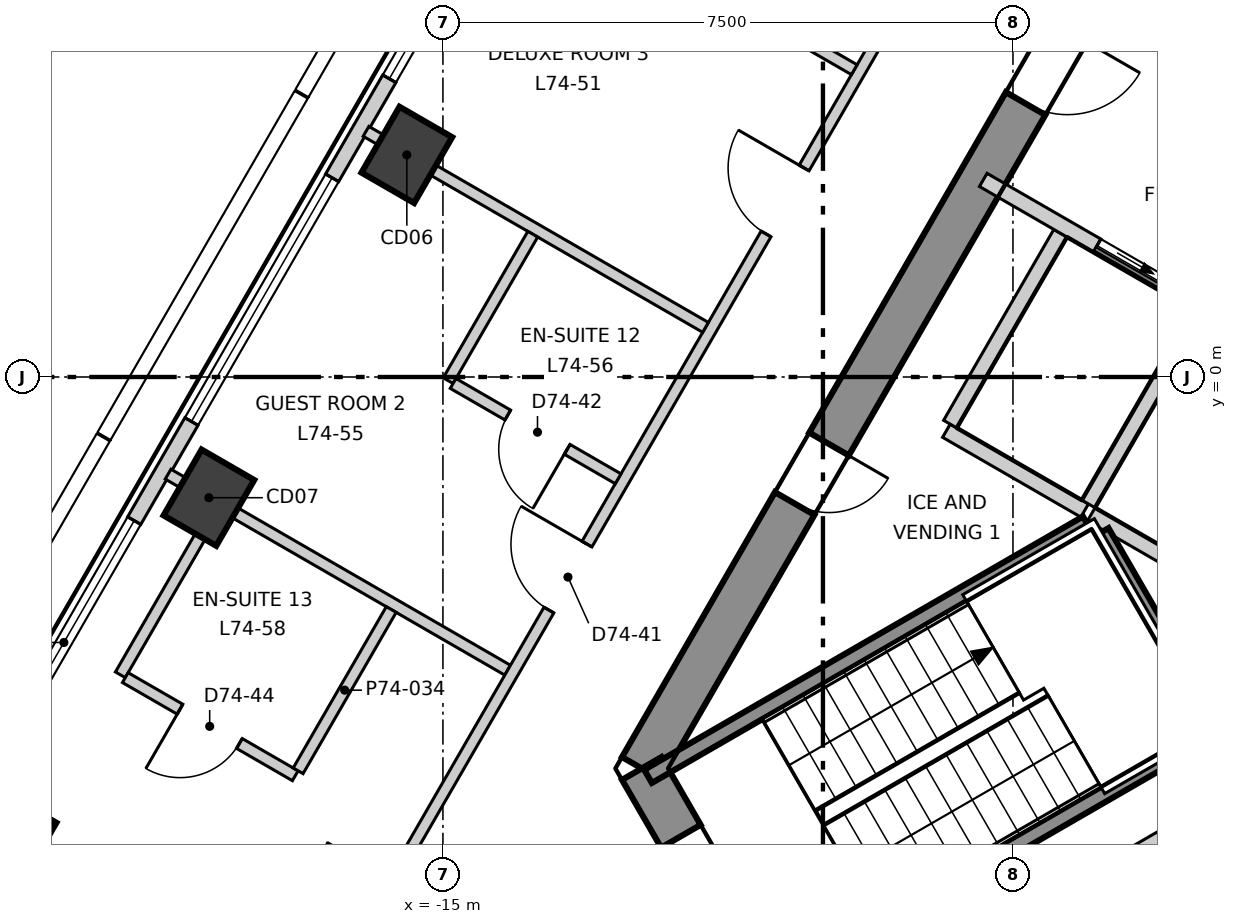
"""IFC4 building model, lengths in metres.
Left out: names, types, materials, properties, quantities, classifications, styles, units other than length and angle.
Written with IfcOpenShell. Run it as: python <this file> out.ifc"""

import sys

from ifc_helpers import new_model, si_unit, direction, frame, frame_2d, origin, origin_2d, place, context, subcontext, project, spatial, polyline, rectangle, outline, extrude, element, fill, save


model = new_model("IFC4")
c1 = context("Model", 3, precision=1e-05, world=origin(), true_north=direction((0.0, 1.0)))
c2 = subcontext(c1, "Body", "Model", "MODEL_VIEW")
j1 = project(units=[si_unit("LENGTHUNIT", "METRE"), si_unit("PLANEANGLEUNIT", "RADIAN")], contexts=[c1])
p1 = place(None, origin())
s1 = spatial("IfcSite", under=j1, at=p1, CompositionType="ELEMENT")
p2 = place(p1, origin())
s2 = spatial("IfcBuilding", under=s1, at=p2, CompositionType="ELEMENT")
p3 = place(p2, frame((0.0, 0.0, 311.5)))
s3 = spatial("IfcBuildingStorey", under=s2, at=p3, CompositionType="ELEMENT", Elevation=311.5)
p4 = place(p3, frame((-1.732, 13.3, -0.3), z_axis=(0.0, 0.0, 1.0), x_axis=(-0.500000539815, -0.866025092122, 0.0)))
e1 = element("IfcWall", 1, at=p4, inside=s3, PredefinedType="SHEAR", context=c2, shape_type="SweptSolid", body=[
    extrude(outline(polyline([(-0.173, -0.3), (1.795, -0.3), (3.763, -0.3), (5.732, -0.3), (7.7, -0.3), (9.668, -0.301), (11.637, -0.301), (13.605, -0.301), (15.573, -0.301), (17.542, -0.301), (19.51, -0.301), (21.478, -0.301), (21.131, 0.3), (19.226, 0.3), (17.321, 0.3), (15.415, 0.3), (13.51, 0.3), (11.605, 0.3), (9.699, 0.3), (7.794, 0.3), (5.889, 0.3), (3.984, 0.3), (2.078, 0.3), (0.173, 0.3), (-0.173, -0.3)])), origin(), (0.0, 0.0, 1.0), 3.6),
])
p5 = place(p4, frame((10.102, 0.0, 0.3)))
e2 = element("IfcOpeningElement", 2, at=p5, cuts=e1, PredefinedType="OPENING", context=c2, shape_type="SweptSolid", body=[
    extrude(rectangle(XDim=1.1, YDim=2.1, at=frame_2d((0.55, 1.05))), frame((0.0, 0.31, 0.0), z_axis=(0.0, -1.0, 0.0), x_axis=(1.0, 0.0, 0.0)), (0.0, 0.0, 1.0), 0.621),
])
p6 = place(p4, frame((16.378, 0.0, 0.3)))
e3 = element("IfcOpeningElement", 3, at=p6, cuts=e1, PredefinedType="OPENING", context=c2, shape_type="SweptSolid", body=[
    extrude(rectangle(XDim=0.9, YDim=2.1, at=frame_2d((0.45, 1.05))), frame((0.0, 0.31, 0.0), z_axis=(0.0, -1.0, 0.0), x_axis=(1.0, 0.0, 0.0)), (0.0, 0.0, 1.0), 0.621),
])
p7 = place(p4, frame((4.106, 0.0, 0.3)))
e4 = element("IfcOpeningElement", 4, at=p7, cuts=e1, PredefinedType="OPENING", context=c2, shape_type="SweptSolid", body=[
    extrude(rectangle(XDim=1.0, YDim=2.1, at=frame_2d((0.5, 1.05))), frame((0.0, 0.31, 0.0), z_axis=(0.0, -1.0, 0.0), x_axis=(1.0, 0.0, 0.0)), (0.0, 0.0, 1.0), 0.621),
])
p8 = place(p3, frame((-12.384, -5.15, -0.3), z_axis=(0.0, 0.0, 1.0), x_axis=(0.49997462182, -0.866040055388, 0.0)))
e5 = element("IfcWall", 5, at=p8, inside=s3, PredefinedType="SHEAR", context=c2, shape_type="SweptSolid", body=[
    extrude(outline(polyline([(-0.173, -0.301), (1.732, -0.301), (3.637, -0.3), (3.291, 0.3), (1.732, 0.3), (0.173, 0.3), (-0.173, -0.301)])), origin(), (0.0, 0.0, 1.0), 3.6),
])
p9 = place(p8, frame((1.032, 0.0, 0.3)))
e6 = element("IfcOpeningElement", 6, at=p9, cuts=e5, PredefinedType="OPENING", context=c2, shape_type="SweptSolid", body=[
    extrude(rectangle(XDim=1.4, YDim=2.1, at=frame_2d((0.7, 1.05))), frame((0.0, 0.31, 0.0), z_axis=(0.0, -1.0, 0.0), x_axis=(1.0, 0.0, 0.0)), (0.0, 0.0, 1.0), 0.621),
])
for number, where, z_axis, x_axis in (
    (7, (-15.475, 2.922, -0.3), (0.0, 0.0, 1.0), (0.5, 0.866, 0.0)),
    (8, (-18.079, -1.588, -0.3), (0.0, 0.0, 1.0), (0.5, 0.866, 0.0)),
    (9, (-20.682, -6.097, -0.3), (0.0, 0.0, 1.0), (0.5, 0.866, 0.0)),
):
    element("IfcColumn", number, at=place(p3, frame(where, z_axis=z_axis, x_axis=x_axis)), inside=s3, PredefinedType="COLUMN", context=c2, shape_type="SweptSolid", body=[
        extrude(rectangle(XDim=1.0, YDim=0.8, at=origin_2d()), origin(), (0.0, 0.0, 1.0), 3.6),
    ])
p10 = place(p3, frame((-2.412, 26.948, 0.0), z_axis=(0.0, 0.0, 1.0), x_axis=(-0.500002044679, -0.866024223285, 0.0)))
e10 = element("IfcWall", 10, at=p10, inside=s3, PredefinedType="ELEMENTEDWALL", context=c2, shape_type="SweptSolid", body=[
    extrude(rectangle(XDim=44.243, YDim=0.2, at=frame_2d((22.122, 0.0))), origin(), (0.0, 0.0, 1.0), 3.3),
])
p11 = place(p10, frame((2.056, 0.0, 0.9)))
e11 = element("IfcOpeningElement", 11, at=p11, cuts=e10, PredefinedType="OPENING", context=c2, shape_type="SweptSolid", body=[
    extrude(rectangle(XDim=3.7, YDim=2.2, at=frame_2d((1.85, 1.1))), frame((0.0, 0.11, 0.0), z_axis=(0.0, -1.0, 0.0), x_axis=(1.0, 0.0, 0.0)), (0.0, 0.0, 1.0), 0.22),
])
p12 = place(p10, frame((7.263, 0.0, 0.9)))
e12 = element("IfcOpeningElement", 12, at=p12, cuts=e10, PredefinedType="OPENING", context=c2, shape_type="SweptSolid", body=[
    extrude(rectangle(XDim=3.7, YDim=2.2, at=frame_2d((1.85, 1.1))), frame((0.0, 0.11, 0.0), z_axis=(0.0, -1.0, 0.0), x_axis=(1.0, 0.0, 0.0)), (0.0, 0.0, 1.0), 0.22),
])
p13 = place(p10, frame((12.471, 0.0, 0.9)))
e13 = element("IfcOpeningElement", 13, at=p13, cuts=e10, PredefinedType="OPENING", context=c2, shape_type="SweptSolid", body=[
    extrude(rectangle(XDim=3.7, YDim=2.2, at=frame_2d((1.85, 1.1))), frame((0.0, 0.11, 0.0), z_axis=(0.0, -1.0, 0.0), x_axis=(1.0, 0.0, 0.0)), (0.0, 0.0, 1.0), 0.22),
])
p14 = place(p10, frame((17.678, 0.0, 0.9)))
e14 = element("IfcOpeningElement", 14, at=p14, cuts=e10, PredefinedType="OPENING", context=c2, shape_type="SweptSolid", body=[
    extrude(rectangle(XDim=3.7, YDim=2.2, at=frame_2d((1.85, 1.1))), frame((0.0, 0.11, 0.0), z_axis=(0.0, -1.0, 0.0), x_axis=(1.0, 0.0, 0.0)), (0.0, 0.0, 1.0), 0.22),
])
p15 = place(p10, frame((22.885, 0.0, 0.9)))
e15 = element("IfcOpeningElement", 15, at=p15, cuts=e10, PredefinedType="OPENING", context=c2, shape_type="SweptSolid", body=[
    extrude(rectangle(XDim=3.7, YDim=2.2, at=frame_2d((1.85, 1.1))), frame((0.0, 0.11, 0.0), z_axis=(0.0, -1.0, 0.0), x_axis=(1.0, 0.0, 0.0)), (0.0, 0.0, 1.0), 0.22),
])
p16 = place(p10, frame((28.092, 0.0, 0.9)))
e16 = element("IfcOpeningElement", 16, at=p16, cuts=e10, PredefinedType="OPENING", context=c2, shape_type="SweptSolid", body=[
    extrude(rectangle(XDim=3.7, YDim=2.2, at=frame_2d((1.85, 1.1))), frame((0.0, 0.11, 0.0), z_axis=(0.0, -1.0, 0.0), x_axis=(1.0, 0.0, 0.0)), (0.0, 0.0, 1.0), 0.22),
])
p17 = place(p10, frame((33.3, 0.0, 0.9)))
e17 = element("IfcOpeningElement", 17, at=p17, cuts=e10, PredefinedType="OPENING", context=c2, shape_type="SweptSolid", body=[
    extrude(rectangle(XDim=3.7, YDim=2.2, at=frame_2d((1.85, 1.1))), frame((0.0, 0.11, 0.0), z_axis=(0.0, -1.0, 0.0), x_axis=(1.0, 0.0, 0.0)), (0.0, 0.0, 1.0), 0.22),
])
p18 = place(p10, frame((38.507, 0.0, 0.9)))
e18 = element("IfcOpeningElement", 18, at=p18, cuts=e10, PredefinedType="OPENING", context=c2, shape_type="SweptSolid", body=[
    extrude(rectangle(XDim=3.7, YDim=2.2, at=frame_2d((1.85, 1.1))), frame((0.0, 0.11, 0.0), z_axis=(0.0, -1.0, 0.0), x_axis=(1.0, 0.0, 0.0)), (0.0, 0.0, 1.0), 0.22),
])
p19 = place(p3, frame((-18.616, -1.278, 0.0), z_axis=(0.0, 0.0, 1.0), x_axis=(0.86604134632, -0.499972385701, 0.0)))
e19 = element("IfcWall", 19, at=p19, inside=s3, PredefinedType="PARTITIONING", context=c2, shape_type="SweptSolid", body=[
    extrude(rectangle(XDim=5.158, YDim=0.15, at=frame_2d((2.579, 0.0))), origin(), (0.0, 0.0, 1.0), 3.3),
])
p20 = place(p3, frame((-17.678, -10.12, 0.0), z_axis=(0.0, 0.0, 1.0), x_axis=(0.49998824015, 0.86603219323, 0.0)))
e20 = element("IfcWall", 20, at=p20, inside=s3, PredefinedType="PARTITIONING", context=c2, shape_type="SweptSolid", body=[
    extrude(rectangle(XDim=35.357, YDim=0.15, at=frame_2d((17.678, 0.0))), origin(), (0.0, 0.0, 1.0), 3.3),
])
p21 = place(p20, frame((28.607, 0.0, 0.0)))
e21 = element("IfcOpeningElement", 21, at=p21, cuts=e20, PredefinedType="OPENING", context=c2, shape_type="SweptSolid", body=[
    extrude(rectangle(XDim=1.0, YDim=2.1, at=frame_2d((0.5, 1.05))), frame((0.0, 0.085, 0.0), z_axis=(0.0, -1.0, 0.0), x_axis=(1.0, 0.0, 0.0)), (0.0, 0.0, 1.0), 0.17),
])
p22 = place(p20, frame((13.86, 0.0, 0.0)))
e22 = element("IfcOpeningElement", 22, at=p22, cuts=e20, PredefinedType="OPENING", context=c2, shape_type="SweptSolid", body=[
    extrude(rectangle(XDim=1.0, YDim=2.1, at=frame_2d((0.5, 1.05))), frame((0.0, 0.085, 0.0), z_axis=(0.0, -1.0, 0.0), x_axis=(1.0, 0.0, 0.0)), (0.0, 0.0, 1.0), 0.17),
])
p23 = place(p20, frame((18.96, 0.0, 0.0)))
e23 = element("IfcOpeningElement", 23, at=p23, cuts=e20, PredefinedType="OPENING", context=c2, shape_type="SweptSolid", body=[
    extrude(rectangle(XDim=0.9, YDim=2.1, at=frame_2d((0.45, 1.05))), frame((0.0, 0.085, 0.0), z_axis=(0.0, -1.0, 0.0), x_axis=(1.0, 0.0, 0.0)), (0.0, 0.0, 1.0), 0.17),
])
p24 = place(p20, frame((16.86, 0.0, 0.0)))
e24 = element("IfcOpeningElement", 24, at=p24, cuts=e20, PredefinedType="OPENING", context=c2, shape_type="SweptSolid", body=[
    extrude(rectangle(XDim=0.9, YDim=2.1, at=frame_2d((0.45, 1.05))), frame((0.0, 0.085, 0.0), z_axis=(0.0, -1.0, 0.0), x_axis=(1.0, 0.0, 0.0)), (0.0, 0.0, 1.0), 0.17),
])
p25 = place(p20, frame((8.146, 0.0, 0.0)))
e25 = element("IfcOpeningElement", 25, at=p25, cuts=e20, PredefinedType="OPENING", context=c2, shape_type="SweptSolid", body=[
    extrude(rectangle(XDim=1.0, YDim=2.1, at=frame_2d((0.5, 1.05))), frame((0.0, 0.085, 0.0), z_axis=(0.0, -1.0, 0.0), x_axis=(1.0, 0.0, 0.0)), (0.0, 0.0, 1.0), 0.17),
])
p26 = place(p20, frame((3.038, 0.0, 0.0)))
e26 = element("IfcOpeningElement", 26, at=p26, cuts=e20, PredefinedType="OPENING", context=c2, shape_type="SweptSolid", body=[
    extrude(rectangle(XDim=1.0, YDim=2.1, at=frame_2d((0.5, 1.05))), frame((0.0, 0.085, 0.0), z_axis=(0.0, -1.0, 0.0), x_axis=(1.0, 0.0, 0.0)), (0.0, 0.0, 1.0), 0.17),
])
p27 = place(p3, frame((-16.012, 3.232, 0.0), z_axis=(0.0, 0.0, 1.0), x_axis=(0.86604134632, -0.499972385701, 0.0)))
e27 = element("IfcWall", 27, at=p27, inside=s3, PredefinedType="PARTITIONING", context=c2, shape_type="SweptSolid", body=[
    extrude(rectangle(XDim=5.158, YDim=0.15, at=frame_2d((2.579, 0.0))), origin(), (0.0, 0.0, 1.0), 3.3),
])
p28 = place(p3, frame((-11.71, 5.268, 0.0), z_axis=(0.0, 0.0, 1.0), x_axis=(0.8660395779, -0.499975448907, 0.0)))
e28 = element("IfcWall", 28, at=p28, inside=s3, PredefinedType="PARTITIONING", context=c2, shape_type="SweptSolid", body=[
    extrude(rectangle(XDim=2.45, YDim=0.15, at=frame_2d((1.225, 0.0))), origin(), (0.0, 0.0, 1.0), 3.3),
])
p29 = place(p3, frame((-19.244, -3.918, 0.0), z_axis=(0.0, 0.0, 1.0), x_axis=(0.500079482444, 0.865979509711, 0.0)))
e29 = element("IfcWall", 29, at=p29, inside=s3, PredefinedType="PARTITIONING", context=c2, shape_type="SweptSolid", body=[
    extrude(rectangle(XDim=2.525, YDim=0.15, at=frame_2d((1.263, 0.0))), origin(), (0.0, 0.0, 1.0), 2.6),
])
p30 = place(p3, frame((-19.179, -3.955, 0.0), z_axis=(0.0, 0.0, 1.0), x_axis=(0.865999760466, -0.500044412901, 0.0)))
e30 = element("IfcWall", 30, at=p30, inside=s3, PredefinedType="PARTITIONING", context=c2, shape_type="SweptSolid", body=[
    extrude(rectangle(XDim=2.582, YDim=0.15, at=frame_2d((1.291, 0.0))), origin(), (0.0, 0.0, 1.0), 3.3),
])
p31 = place(p30, frame((0.832, 0.0, 0.0)))
e31 = element("IfcOpeningElement", 31, at=p31, cuts=e30, PredefinedType="OPENING", context=c2, shape_type="SweptSolid", body=[
    extrude(rectangle(XDim=0.9, YDim=2.1, at=frame_2d((0.45, 1.05))), frame((0.0, 0.085, 0.0), z_axis=(0.0, -1.0, 0.0), x_axis=(1.0, 0.0, 0.0)), (0.0, 0.0, 1.0), 0.17),
])
p32 = place(p3, frame((-16.905, -5.181, 0.0), z_axis=(0.0, 0.0, 1.0), x_axis=(0.500018594424, 0.866014668023, 0.0)))
e32 = element("IfcWall", 32, at=p32, inside=s3, PredefinedType="PARTITIONING", context=c2, shape_type="SweptSolid", body=[
    extrude(rectangle(XDim=2.45, YDim=0.15, at=frame_2d((1.225, 0.0))), origin(), (0.0, 0.0, 1.0), 3.3),
])
p33 = place(p3, frame((-14.931, -0.048, 0.0), z_axis=(0.0, 0.0, 1.0), x_axis=(0.500080171303, 0.865979111913, 0.0)))
e33 = element("IfcWall", 33, at=p33, inside=s3, PredefinedType="PARTITIONING", context=c2, shape_type="SweptSolid", body=[
    extrude(rectangle(XDim=2.225, YDim=0.15, at=frame_2d((1.113, 0.0))), origin(), (0.0, 0.0, 1.0), 3.3),
])
p34 = place(p3, frame((-14.866, -0.085, 0.0), z_axis=(0.0, 0.0, 1.0), x_axis=(0.865890381195, -0.500233793095, 0.0)))
e34 = element("IfcWall", 34, at=p34, inside=s3, PredefinedType="PARTITIONING", context=c2, shape_type="SweptSolid", body=[
    extrude(rectangle(XDim=2.507, YDim=0.15, at=frame_2d((1.253, 0.0))), origin(), (0.0, 0.0, 1.0), 3.3),
])
p35 = place(p34, frame((0.832, 0.0, 0.0)))
e35 = element("IfcOpeningElement", 35, at=p35, cuts=e34, PredefinedType="OPENING", context=c2, shape_type="SweptSolid", body=[
    extrude(rectangle(XDim=0.9, YDim=2.1, at=frame_2d((0.45, 1.05))), frame((0.0, 0.085, 0.0), z_axis=(0.0, -1.0, 0.0), x_axis=(1.0, 0.0, 0.0)), (0.0, 0.0, 1.0), 0.17),
])
p36 = place(p3, frame((-8.376, -0.707, 0.0), z_axis=(0.0, 0.0, 1.0), x_axis=(0.866067520717, -0.499927044236, 0.0)))
e36 = element("IfcWall", 36, at=p36, inside=s3, PredefinedType="SOLIDWALL", context=c2, shape_type="SweptSolid", body=[
    extrude(rectangle(XDim=2.1, YDim=0.2, at=frame_2d((1.05, 0.0))), origin(), (0.0, 0.0, 1.0), 3.3),
])
p37 = place(p3, frame((-8.326, -0.62, 0.0), z_axis=(0.0, 0.0, 1.0), x_axis=(0.500023687443, 0.866011727401, 0.0)))
e37 = element("IfcWall", 37, at=p37, inside=s3, PredefinedType="SOLIDWALL", context=c2, shape_type="SweptSolid", body=[
    extrude(rectangle(XDim=2.9, YDim=0.2, at=frame_2d((1.45, 0.0))), origin(), (0.0, 0.0, 1.0), 3.3),
])
p38 = place(p3, frame((-7.891, 2.593, 0.0), z_axis=(0.0, 0.0, 1.0), x_axis=(0.866070917804, -0.499921159118, 0.0)))
e38 = element("IfcWall", 38, at=p38, inside=s3, PredefinedType="SOLIDWALL", context=c2, shape_type="SweptSolid", body=[
    extrude(rectangle(XDim=3.333, YDim=0.2, at=frame_2d((1.666, 0.0))), origin(), (0.0, 0.0, 1.0), 3.3),
])
p39 = place(p38, frame((1.73, 0.0, 0.0)))
e39 = element("IfcOpeningElement", 39, at=p39, cuts=e38, PredefinedType="OPENING", context=c2, shape_type="SweptSolid", body=[
    extrude(rectangle(XDim=1.1, YDim=2.1, at=frame_2d((0.55, 1.05))), frame((0.0, 0.11, 0.0), z_axis=(0.0, -1.0, 0.0), x_axis=(1.0, 0.0, 0.0)), (0.0, 0.0, 1.0), 0.22),
])
p40 = place(p3, frame((-6.191, 5.537, 0.0), z_axis=(0.0, 0.0, 1.0), x_axis=(0.866052607023, -0.499952879648, 0.0)))
e40 = element("IfcWall", 40, at=p40, inside=s3, PredefinedType="SOLIDWALL", context=c2, shape_type="SweptSolid", body=[
    extrude(rectangle(XDim=3.332, YDim=0.2, at=frame_2d((1.666, 0.0))), origin(), (0.0, 0.0, 1.0), 3.3),
])
p41 = place(p40, frame((1.83, 0.0, 0.0)))
e41 = element("IfcOpeningElement", 41, at=p41, cuts=e40, PredefinedType="OPENING", context=c2, shape_type="SweptSolid", body=[
    extrude(rectangle(XDim=0.9, YDim=2.1, at=frame_2d((0.45, 1.05))), frame((0.0, 0.11, 0.0), z_axis=(0.0, -1.0, 0.0), x_axis=(1.0, 0.0, 0.0)), (0.0, 0.0, 1.0), 0.22),
])
p42 = place(p3, frame((-6.507, -1.67, 0.0), z_axis=(0.0, 0.0, 1.0), x_axis=(0.50012328804, 0.865954211699, 0.0)))
e42 = element("IfcWall", 42, at=p42, inside=s3, PredefinedType="SOLIDWALL", context=c2, shape_type="SweptSolid", body=[
    extrude(rectangle(XDim=2.9, YDim=0.2, at=frame_2d((1.45, 0.0))), origin(), (0.0, 0.0, 1.0), 3.3),
])
p43 = place(p3, frame((-6.47, -1.807, 0.0), z_axis=(0.0, 0.0, 1.0), x_axis=(0.865883195159, -0.500246231712, 0.0)))
e43 = element("IfcWall", 43, at=p43, inside=s3, PredefinedType="SOLIDWALL", context=c2, shape_type="SweptSolid", body=[
    extrude(rectangle(XDim=1.815, YDim=0.2, at=frame_2d((0.908, 0.0))), origin(), (0.0, 0.0, 1.0), 3.3),
])
p44 = place(p3, frame((-9.115, -8.13, 0.0), z_axis=(0.0, 0.0, 1.0), x_axis=(0.866002649306, 0.500039409842, 0.0)))
e44 = element("IfcWall", 44, at=p44, inside=s3, PredefinedType="SOLIDWALL", context=c2, shape_type="SweptSolid", body=[
    extrude(rectangle(XDim=4.867, YDim=0.2, at=frame_2d((2.434, 0.0))), origin(), (0.0, 0.0, 1.0), 3.3),
])
p45 = place(p3, frame((-12.301, -5.254, 0.0), z_axis=(0.0, 0.0, 1.0), x_axis=(0.866068467981, 0.499925403204, 0.0)))
e45 = element("IfcWall", 45, at=p45, inside=s3, PredefinedType="SOLIDWALL", context=c2, shape_type="SweptSolid", body=[
    extrude(rectangle(XDim=6.665, YDim=0.2, at=frame_2d((3.332, 0.0))), origin(), (0.0, 0.0, 1.0), 3.3),
])
p46 = place(p3, frame((-6.329, -2.038, 0.0), z_axis=(0.0, 0.0, 1.0), x_axis=(0.500200581029, -0.865909567298, 0.0)))
e46 = element("IfcWall", 46, at=p46, inside=s3, PredefinedType="SOLIDWALL", context=c2, shape_type="SweptSolid", body=[
    extrude(rectangle(XDim=2.799, YDim=0.2, at=frame_2d((1.399, 0.0))), origin(), (0.0, 0.0, 1.0), 3.3),
])
p47 = place(p3, frame((-10.701, -8.026, 0.0), z_axis=(0.0, 0.0, 1.0), x_axis=(0.866005022404, 0.500035299925, 0.0)))
e47 = element("IfcWall", 47, at=p47, inside=s3, PredefinedType="SOLIDWALL", context=c2, shape_type="SweptSolid", body=[
    extrude(rectangle(XDim=6.665, YDim=0.2, at=frame_2d((3.333, 0.0))), origin(), (0.0, 0.0, 1.0), 3.3),
])
p48 = place(p15, origin())
e48 = element("IfcWindow", 48, at=p48, inside=s3, PartitioningType="SINGLE_PANEL", PredefinedType="WINDOW", context=c2, shape_type="SweptSolid", body=[
    extrude(rectangle(XDim=3.7, YDim=2.2, at=frame_2d((1.85, 1.1))), frame((0.0, 0.03, 0.0), z_axis=(0.0, -1.0, 0.0), x_axis=(1.0, 0.0, 0.0)), (0.0, 0.0, 1.0), 0.06),
])
fill(e15, e48)
p49 = place(p16, origin())
e49 = element("IfcWindow", 49, at=p49, inside=s3, PartitioningType="SINGLE_PANEL", PredefinedType="WINDOW", context=c2, shape_type="SweptSolid", body=[
    extrude(rectangle(XDim=3.7, YDim=2.2, at=frame_2d((1.85, 1.1))), frame((0.0, 0.03, 0.0), z_axis=(0.0, -1.0, 0.0), x_axis=(1.0, 0.0, 0.0)), (0.0, 0.0, 1.0), 0.06),
])
fill(e16, e49)
p50 = place(p17, origin())
e50 = element("IfcWindow", 50, at=p50, inside=s3, PartitioningType="SINGLE_PANEL", PredefinedType="WINDOW", context=c2, shape_type="SweptSolid", body=[
    extrude(rectangle(XDim=3.7, YDim=2.2, at=frame_2d((1.85, 1.1))), frame((0.0, 0.03, 0.0), z_axis=(0.0, -1.0, 0.0), x_axis=(1.0, 0.0, 0.0)), (0.0, 0.0, 1.0), 0.06),
])
fill(e17, e50)
p51 = place(p39, origin())
e51 = element("IfcDoor", 51, at=p51, inside=s3, OperationType="SLIDING_TO_LEFT", PredefinedType="DOOR", context=c2, shape_type="SweptSolid", body=[
    extrude(rectangle(XDim=1.1, YDim=2.1, at=frame_2d((0.55, 1.05))), frame((0.0, 0.025, 0.0), z_axis=(0.0, -1.0, 0.0), x_axis=(1.0, 0.0, 0.0)), (0.0, 0.0, 1.0), 0.05),
])
fill(e39, e51)
p52 = place(p22, origin())
e52 = element("IfcDoor", 52, at=p52, inside=s3, OperationType="SINGLE_SWING_LEFT", PredefinedType="DOOR", context=c2, shape_type="SweptSolid", body=[
    extrude(rectangle(XDim=1.0, YDim=2.1, at=frame_2d((0.5, 1.05))), frame((0.0, 0.025, 0.0), z_axis=(0.0, -1.0, 0.0), x_axis=(1.0, 0.0, 0.0)), (0.0, 0.0, 1.0), 0.05),
])
fill(e22, e52)
p53 = place(p25, origin())
e53 = element("IfcDoor", 53, at=p53, inside=s3, OperationType="SINGLE_SWING_LEFT", PredefinedType="DOOR", context=c2, shape_type="SweptSolid", body=[
    extrude(rectangle(XDim=1.0, YDim=2.1, at=frame_2d((0.5, 1.05))), frame((0.0, 0.025, 0.0), z_axis=(0.0, -1.0, 0.0), x_axis=(1.0, 0.0, 0.0)), (0.0, 0.0, 1.0), 0.05),
])
fill(e25, e53)
p54 = place(p35, origin())
e54 = element("IfcDoor", 54, at=p54, inside=s3, OperationType="SINGLE_SWING_RIGHT", PredefinedType="DOOR", context=c2, shape_type="SweptSolid", body=[
    extrude(rectangle(XDim=0.9, YDim=2.1, at=frame_2d((0.45, 1.05))), frame((0.0, 0.025, 0.0), z_axis=(0.0, -1.0, 0.0), x_axis=(1.0, 0.0, 0.0)), (0.0, 0.0, 1.0), 0.05),
])
fill(e35, e54)
p55 = place(p31, origin())
e55 = element("IfcDoor", 55, at=p55, inside=s3, OperationType="SINGLE_SWING_LEFT", PredefinedType="DOOR", context=c2, shape_type="SweptSolid", body=[
    extrude(rectangle(XDim=0.9, YDim=2.1, at=frame_2d((0.45, 1.05))), frame((0.0, 0.025, 0.0), z_axis=(0.0, -1.0, 0.0), x_axis=(1.0, 0.0, 0.0)), (0.0, 0.0, 1.0), 0.05),
])
fill(e31, e55)
p56 = place(p9, origin())
e56 = element("IfcDoor", 56, at=p56, inside=s3, OperationType="DOUBLE_DOOR_SINGLE_SWING", PredefinedType="DOOR", context=c2, shape_type="SweptSolid", body=[
    extrude(rectangle(XDim=1.4, YDim=2.1, at=frame_2d((0.7, 1.05))), frame((0.0, 0.025, 0.0), z_axis=(0.0, -1.0, 0.0), x_axis=(1.0, 0.0, 0.0)), (0.0, 0.0, 1.0), 0.05),
])
fill(e6, e56)
p57 = place(p5, origin())
e57 = element("IfcDoor", 57, at=p57, inside=s3, OperationType="SINGLE_SWING_RIGHT", PredefinedType="DOOR", context=c2, shape_type="SweptSolid", body=[
    extrude(rectangle(XDim=1.1, YDim=2.1, at=frame_2d((0.55, 1.05))), frame((0.0, 0.025, 0.0), z_axis=(0.0, -1.0, 0.0), x_axis=(1.0, 0.0, 0.0)), (0.0, 0.0, 1.0), 0.05),
])
fill(e2, e57)
p58 = place(p6, origin())
e58 = element("IfcDoor", 58, at=p58, inside=s3, OperationType="SINGLE_SWING_RIGHT", PredefinedType="DOOR", context=c2, shape_type="SweptSolid", body=[
    extrude(rectangle(XDim=0.9, YDim=2.1, at=frame_2d((0.45, 1.05))), frame((0.0, 0.025, 0.0), z_axis=(0.0, -1.0, 0.0), x_axis=(1.0, 0.0, 0.0)), (0.0, 0.0, 1.0), 0.05),
])
fill(e3, e58)
save(model, sys.argv[1])
